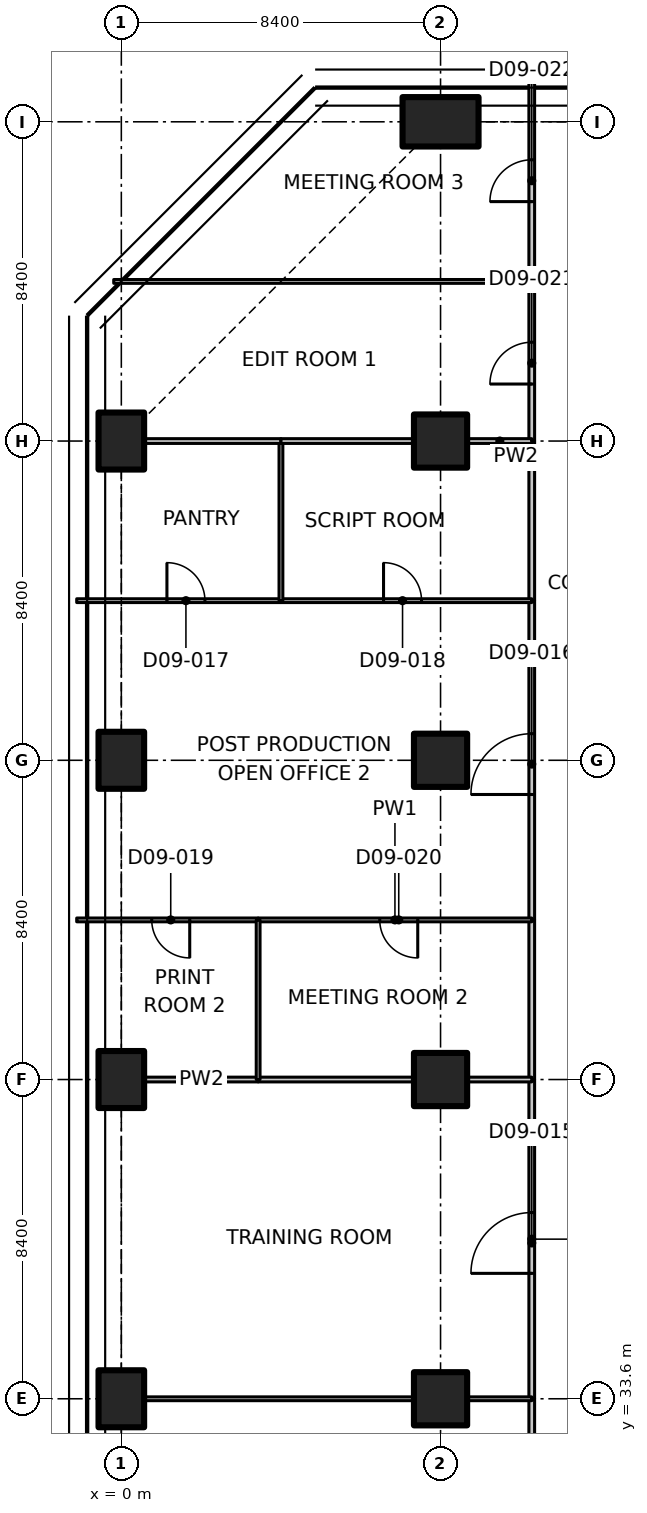
"""IFC4 building model, lengths in metres.
Left out: names, types, materials, properties, quantities, classifications, styles, units other than length and angle.
Written with IfcOpenShell. Run it as: python <this file> out.ifc"""

import sys

from ifc_helpers import new_model, si_unit, direction, frame, frame_2d, origin, origin_2d, place, context, subcontext, project, spatial, polyline, rectangle, outline, extrude, element, fill, save


model = new_model("IFC4")
c1 = context("Model", 3, precision=1e-05, world=origin(), true_north=direction((0.0, 1.0)))
c2 = subcontext(c1, "Body", "Model", "MODEL_VIEW")
j1 = project(units=[si_unit("LENGTHUNIT", "METRE"), si_unit("PLANEANGLEUNIT", "RADIAN")], contexts=[c1])
p1 = place(None, origin())
s1 = spatial("IfcSite", under=j1, at=p1, CompositionType="ELEMENT")
p2 = place(p1, origin())
s2 = spatial("IfcBuilding", under=s1, at=p2, CompositionType="ELEMENT")
p3 = place(p2, frame((0.0, 0.0, 58.1)))
s3 = spatial("IfcBuildingStorey", under=s2, at=p3, CompositionType="ELEMENT", Elevation=58.1)
for number, where, z_axis, x_axis in (
    (1, (0.0, 33.6, 0.0), (0.0, 0.0, 1.0), (1.0, 0.0, 0.0)),
    (2, (0.0, 42.0, 0.0), (0.0, 0.0, 1.0), (1.0, 0.0, 0.0)),
    (3, (0.0, 50.4, 0.0), (0.0, 0.0, 1.0), (1.0, 0.0, 0.0)),
    (4, (0.0, 58.8, 0.0), (0.0, 0.0, 1.0), (1.0, 0.0, 0.0)),
):
    element("IfcColumn", number, at=place(p3, frame(where, z_axis=z_axis, x_axis=x_axis)), inside=s3, PredefinedType="COLUMN", context=c2, shape_type="SweptSolid", body=[
        extrude(rectangle(XDim=1.2, YDim=1.5, at=origin_2d()), origin(), (0.0, 0.0, 1.0), 3.35),
    ])
for number, where, z_axis, x_axis in (
    (5, (8.4, 33.6, 0.0), (0.0, 0.0, 1.0), (1.0, 0.0, 0.0)),
    (6, (8.4, 42.0, 0.0), (0.0, 0.0, 1.0), (1.0, 0.0, 0.0)),
    (7, (8.4, 50.4, 0.0), (0.0, 0.0, 1.0), (1.0, 0.0, 0.0)),
    (8, (8.4, 58.8, 0.0), (0.0, 0.0, 1.0), (1.0, 0.0, 0.0)),
):
    element("IfcColumn", number, at=place(p3, frame(where, z_axis=z_axis, x_axis=x_axis)), inside=s3, PredefinedType="COLUMN", context=c2, shape_type="SweptSolid", body=[
        extrude(rectangle(XDim=1.4, YDim=1.4, at=origin_2d()), origin(), (0.0, 0.0, 1.0), 3.35),
    ])
p4 = place(p3, frame((8.4, 67.2, 0.0), z_axis=(0.0, 0.0, 1.0), x_axis=(0.0, 1.0, 0.0)))
e9 = element("IfcColumn", 9, at=p4, inside=s3, PredefinedType="COLUMN", context=c2, shape_type="SweptSolid", body=[
    extrude(rectangle(XDim=1.3, YDim=2.0, at=origin_2d()), origin(), (0.0, 0.0, 1.0), 3.35),
])
p5 = place(p3, frame((10.8, 25.2, 0.0), z_axis=(0.0, 0.0, 1.0), x_axis=(0.0, 1.0, 0.0)))
e10 = element("IfcWall", 10, at=p5, inside=s3, PredefinedType="PARTITIONING", context=c2, shape_type="SweptSolid", body=[
    extrude(rectangle(XDim=8.4, YDim=0.15, at=frame_2d((4.2, 0.0))), origin(), (0.0, 0.0, 1.0), 3.33),
])
p6 = place(p5, frame((3.3, 0.0, 0.0)))
e11 = element("IfcOpeningElement", 11, at=p6, cuts=e10, PredefinedType="OPENING", context=c2, shape_type="SweptSolid", body=[
    extrude(rectangle(XDim=1.6, YDim=2.1, at=frame_2d((0.8, 1.05))), frame((0.0, 0.085, 0.0), z_axis=(0.0, -1.0, 0.0), x_axis=(1.0, 0.0, 0.0)), (0.0, 0.0, 1.0), 0.17),
])
p7 = place(p3, frame((10.8, 33.6, 0.0), z_axis=(0.0, 0.0, 1.0), x_axis=(0.0, 1.0, 0.0)))
e12 = element("IfcWall", 12, at=p7, inside=s3, PredefinedType="PARTITIONING", context=c2, shape_type="SweptSolid", body=[
    extrude(rectangle(XDim=8.4, YDim=0.15, at=frame_2d((4.2, 0.0))), origin(), (0.0, 0.0, 1.0), 3.33),
])
p8 = place(p7, frame((3.3, 0.0, 0.0)))
e13 = element("IfcOpeningElement", 13, at=p8, cuts=e12, PredefinedType="OPENING", context=c2, shape_type="SweptSolid", body=[
    extrude(rectangle(XDim=1.6, YDim=2.1, at=frame_2d((0.8, 1.05))), frame((0.0, 0.085, 0.0), z_axis=(0.0, -1.0, 0.0), x_axis=(1.0, 0.0, 0.0)), (0.0, 0.0, 1.0), 0.17),
])
p9 = place(p3, frame((10.8, 46.2, 0.0), z_axis=(0.0, 0.0, 1.0), x_axis=(0.0, 1.0, 0.0)))
e14 = element("IfcWall", 14, at=p9, inside=s3, PredefinedType="PARTITIONING", context=c2, shape_type="SweptSolid", body=[
    extrude(rectangle(XDim=8.4, YDim=0.15, at=frame_2d((4.2, 0.0))), origin(), (0.0, 0.0, 1.0), 3.33),
])
p10 = place(p9, frame((3.3, 0.0, 0.0)))
e15 = element("IfcOpeningElement", 15, at=p10, cuts=e14, PredefinedType="OPENING", context=c2, shape_type="SweptSolid", body=[
    extrude(rectangle(XDim=1.6, YDim=2.1, at=frame_2d((0.8, 1.05))), frame((0.0, 0.085, 0.0), z_axis=(0.0, -1.0, 0.0), x_axis=(1.0, 0.0, 0.0)), (0.0, 0.0, 1.0), 0.17),
])
for number, where, z_axis, x_axis in (
    (16, (10.8, 54.6, 0.0), (0.0, 0.0, 1.0), (0.0, 1.0, 0.0)),
    (17, (10.8, 42.0, 0.0), (0.0, 0.0, 1.0), (0.0, 1.0, 0.0)),
):
    element("IfcWall", number, at=place(p3, frame(where, z_axis=z_axis, x_axis=x_axis)), inside=s3, PredefinedType="PARTITIONING", context=c2, shape_type="SweptSolid", body=[
        extrude(rectangle(XDim=4.2, YDim=0.15, at=frame_2d((2.1, 0.0))), origin(), (0.0, 0.0, 1.0), 3.33),
    ])
p11 = place(p3, frame((10.8, 58.8, 0.0), z_axis=(0.0, 0.0, 1.0), x_axis=(0.0, 1.0, 0.0)))
e18 = element("IfcWall", 18, at=p11, inside=s3, PredefinedType="PARTITIONING", context=c2, shape_type="SweptSolid", body=[
    extrude(rectangle(XDim=4.2, YDim=0.15, at=frame_2d((2.1, 0.0))), origin(), (0.0, 0.0, 1.0), 3.33),
])
p12 = place(p11, frame((1.5, 0.0, 0.0)))
e19 = element("IfcOpeningElement", 19, at=p12, cuts=e18, PredefinedType="OPENING", context=c2, shape_type="SweptSolid", body=[
    extrude(rectangle(XDim=1.1, YDim=2.1, at=frame_2d((0.55, 1.05))), frame((0.0, 0.085, 0.0), z_axis=(0.0, -1.0, 0.0), x_axis=(1.0, 0.0, 0.0)), (0.0, 0.0, 1.0), 0.17),
])
p13 = place(p3, frame((10.8, 63.0, 0.0), z_axis=(0.0, 0.0, 1.0), x_axis=(0.0, 1.0, 0.0)))
e20 = element("IfcWall", 20, at=p13, inside=s3, PredefinedType="PARTITIONING", context=c2, shape_type="SweptSolid", body=[
    extrude(outline(polyline([(0.0, 0.0), (5.423, 0.0), (5.423, 3.33), (5.28, 3.33), (4.65, 3.33), (4.648, 2.98), (3.752, 2.98), (3.75, 3.33), (0.0, 3.33), (0.0, 0.0)])), frame((0.0, 0.075, 0.0), z_axis=(0.0, -1.0, 0.0), x_axis=(1.0, 0.0, 0.0)), (0.0, 0.0, 1.0), 0.15),
])
p14 = place(p13, frame((2.1, 0.0, 0.0)))
e21 = element("IfcOpeningElement", 21, at=p14, cuts=e20, PredefinedType="OPENING", context=c2, shape_type="SweptSolid", body=[
    extrude(rectangle(XDim=1.1, YDim=2.1, at=frame_2d((0.55, 1.05))), frame((0.0, 0.085, 0.0), z_axis=(0.0, -1.0, 0.0), x_axis=(1.0, 0.0, 0.0)), (0.0, 0.0, 1.0), 0.17),
])
p15 = place(p3, frame((0.62, 33.6, 0.0), z_axis=(0.0, 0.0, 1.0), x_axis=(1.0, 0.0, 0.0)))
e22 = element("IfcWall", 22, at=p15, inside=s3, PredefinedType="PARTITIONING", context=c2, shape_type="SweptSolid", body=[
    extrude(rectangle(XDim=7.06, YDim=0.1, at=frame_2d((3.53, 0.0))), origin(), (0.0, 0.0, 1.0), 3.33),
])
p16 = place(p3, frame((9.12, 33.6, 0.0), z_axis=(0.0, 0.0, 1.0), x_axis=(1.0, 0.0, 0.0)))
e23 = element("IfcWall", 23, at=p16, inside=s3, PredefinedType="PARTITIONING", context=c2, shape_type="SweptSolid", body=[
    extrude(rectangle(XDim=1.68, YDim=0.1, at=frame_2d((0.84, 0.0))), origin(), (0.0, 0.0, 1.0), 3.33),
])
p17 = place(p3, frame((0.62, 42.0, 0.0), z_axis=(0.0, 0.0, 1.0), x_axis=(1.0, 0.0, 0.0)))
e24 = element("IfcWall", 24, at=p17, inside=s3, PredefinedType="PARTITIONING", context=c2, shape_type="SweptSolid", body=[
    extrude(rectangle(XDim=2.98, YDim=0.125, at=frame_2d((1.49, 0.0))), origin(), (0.0, 0.0, 1.0), 3.33),
])
p18 = place(p3, frame((3.6, 42.0, 0.0), z_axis=(0.0, 0.0, 1.0), x_axis=(1.0, 0.0, 0.0)))
e25 = element("IfcWall", 25, at=p18, inside=s3, PredefinedType="PARTITIONING", context=c2, shape_type="SweptSolid", body=[
    extrude(rectangle(XDim=4.08, YDim=0.125, at=frame_2d((2.04, 0.0))), origin(), (0.0, 0.0, 1.0), 3.33),
])
p19 = place(p3, frame((9.12, 42.0, 0.0), z_axis=(0.0, 0.0, 1.0), x_axis=(1.0, 0.0, 0.0)))
e26 = element("IfcWall", 26, at=p19, inside=s3, PredefinedType="PARTITIONING", context=c2, shape_type="SweptSolid", body=[
    extrude(rectangle(XDim=1.68, YDim=0.125, at=frame_2d((0.84, 0.0))), origin(), (0.0, 0.0, 1.0), 3.33),
])
p20 = place(p3, frame((-1.174, 54.6, 0.0), z_axis=(0.0, 0.0, 1.0), x_axis=(1.0, 0.0, 0.0)))
e27 = element("IfcWall", 27, at=p20, inside=s3, PredefinedType="PARTITIONING", context=c2, shape_type="SweptSolid", body=[
    extrude(outline(polyline([(0.0, 0.0), (5.374, 0.0), (5.374, 3.33), (1.624, 3.33), (1.622, 2.98), (0.726, 2.98), (0.724, 3.33), (0.074, 3.33), (0.0, 3.33), (0.0, 0.0)])), frame((0.0, 0.05, 0.0), z_axis=(0.0, -1.0, 0.0), x_axis=(1.0, 0.0, 0.0)), (0.0, 0.0, 1.0), 0.1),
])
p21 = place(p20, frame((2.374, 0.0, 0.0)))
e28 = element("IfcOpeningElement", 28, at=p21, cuts=e27, PredefinedType="OPENING", context=c2, shape_type="SweptSolid", body=[
    extrude(rectangle(XDim=1.0, YDim=2.1, at=frame_2d((0.5, 1.05))), frame((0.0, 0.06, 0.0), z_axis=(0.0, -1.0, 0.0), x_axis=(1.0, 0.0, 0.0)), (0.0, 0.0, 1.0), 0.12),
])
p22 = place(p3, frame((4.2, 54.6, 0.0), z_axis=(0.0, 0.0, 1.0), x_axis=(1.0, 0.0, 0.0)))
e29 = element("IfcWall", 29, at=p22, inside=s3, PredefinedType="PARTITIONING", context=c2, shape_type="SweptSolid", body=[
    extrude(rectangle(XDim=6.6, YDim=0.1, at=frame_2d((3.3, 0.0))), origin(), (0.0, 0.0, 1.0), 3.33),
])
p23 = place(p22, frame((2.7, 0.0, 0.0)))
e30 = element("IfcOpeningElement", 30, at=p23, cuts=e29, PredefinedType="OPENING", context=c2, shape_type="SweptSolid", body=[
    extrude(rectangle(XDim=1.0, YDim=2.1, at=frame_2d((0.5, 1.05))), frame((0.0, 0.06, 0.0), z_axis=(0.0, -1.0, 0.0), x_axis=(1.0, 0.0, 0.0)), (0.0, 0.0, 1.0), 0.12),
])
p24 = place(p3, frame((3.6, 46.2, 0.0), z_axis=(0.0, 0.0, 1.0), x_axis=(-1.0, 0.0, 0.0)))
e31 = element("IfcWall", 31, at=p24, inside=s3, PredefinedType="PARTITIONING", context=c2, shape_type="SweptSolid", body=[
    extrude(outline(polyline([(0.0, 0.0), (4.774, 0.0), (4.774, 3.33), (4.7, 3.33), (4.05, 3.33), (4.048, 2.98), (3.152, 2.98), (3.15, 3.33), (0.0, 3.33), (0.0, 0.0)])), frame((0.0, 0.05, 0.0), z_axis=(0.0, -1.0, 0.0), x_axis=(1.0, 0.0, 0.0)), (0.0, 0.0, 1.0), 0.1),
])
p25 = place(p24, frame((1.8, 0.0, 0.0)))
e32 = element("IfcOpeningElement", 32, at=p25, cuts=e31, PredefinedType="OPENING", context=c2, shape_type="SweptSolid", body=[
    extrude(rectangle(XDim=1.0, YDim=2.1, at=frame_2d((0.5, 1.05))), frame((0.0, 0.06, 0.0), z_axis=(0.0, -1.0, 0.0), x_axis=(1.0, 0.0, 0.0)), (0.0, 0.0, 1.0), 0.12),
])
p26 = place(p3, frame((10.8, 46.2, 0.0), z_axis=(0.0, 0.0, 1.0), x_axis=(-1.0, 0.0, 0.0)))
e33 = element("IfcWall", 33, at=p26, inside=s3, PredefinedType="PARTITIONING", context=c2, shape_type="SweptSolid", body=[
    extrude(rectangle(XDim=7.2, YDim=0.1, at=frame_2d((3.6, 0.0))), origin(), (0.0, 0.0, 1.0), 3.33),
])
p27 = place(p26, frame((3.0, 0.0, 0.0)))
e34 = element("IfcOpeningElement", 34, at=p27, cuts=e33, PredefinedType="OPENING", context=c2, shape_type="SweptSolid", body=[
    extrude(rectangle(XDim=1.0, YDim=2.1, at=frame_2d((0.5, 1.05))), frame((0.0, 0.06, 0.0), z_axis=(0.0, -1.0, 0.0), x_axis=(1.0, 0.0, 0.0)), (0.0, 0.0, 1.0), 0.12),
])
p28 = place(p3, frame((4.2, 58.8, 0.0), z_axis=(0.0, 0.0, 1.0), x_axis=(0.0, -1.0, 0.0)))
e35 = element("IfcWall", 35, at=p28, inside=s3, PredefinedType="PARTITIONING", context=c2, shape_type="SweptSolid", body=[
    extrude(rectangle(XDim=4.2, YDim=0.1, at=frame_2d((2.1, 0.0))), origin(), (0.0, 0.0, 1.0), 3.33),
])
p29 = place(p3, frame((0.62, 58.8, 0.0), z_axis=(0.0, 0.0, 1.0), x_axis=(1.0, 0.0, 0.0)))
e36 = element("IfcWall", 36, at=p29, inside=s3, PredefinedType="PARTITIONING", context=c2, shape_type="SweptSolid", body=[
    extrude(rectangle(XDim=3.58, YDim=0.125, at=frame_2d((1.79, 0.0))), origin(), (0.0, 0.0, 1.0), 3.33),
])
p30 = place(p3, frame((4.2, 58.8, 0.0), z_axis=(0.0, 0.0, 1.0), x_axis=(1.0, 0.0, 0.0)))
e37 = element("IfcWall", 37, at=p30, inside=s3, PredefinedType="PARTITIONING", context=c2, shape_type="SweptSolid", body=[
    extrude(rectangle(XDim=3.48, YDim=0.125, at=frame_2d((1.74, 0.0))), origin(), (0.0, 0.0, 1.0), 3.33),
])
p31 = place(p3, frame((9.12, 58.8, 0.0), z_axis=(0.0, 0.0, 1.0), x_axis=(1.0, 0.0, 0.0)))
e38 = element("IfcWall", 38, at=p31, inside=s3, PredefinedType="PARTITIONING", context=c2, shape_type="SweptSolid", body=[
    extrude(rectangle(XDim=1.68, YDim=0.125, at=frame_2d((0.84, 0.0))), origin(), (0.0, 0.0, 1.0), 3.33),
])
p32 = place(p3, frame((3.6, 46.2, 0.0), z_axis=(0.0, 0.0, 1.0), x_axis=(0.0, -1.0, 0.0)))
e39 = element("IfcWall", 39, at=p32, inside=s3, PredefinedType="PARTITIONING", context=c2, shape_type="SweptSolid", body=[
    extrude(rectangle(XDim=4.2, YDim=0.1, at=frame_2d((2.1, 0.0))), origin(), (0.0, 0.0, 1.0), 3.33),
])
p33 = place(p3, frame((-0.2, 63.0, 0.0), z_axis=(0.0, 0.0, 1.0), x_axis=(1.0, 0.0, 0.0)))
e40 = element("IfcWall", 40, at=p33, inside=s3, PredefinedType="PARTITIONING", context=c2, shape_type="SweptSolid", body=[
    extrude(outline(polyline([(0.0, 0.0), (11.0, 0.0), (11.0, 3.33), (5.066, 3.33), (5.064, 2.98), (3.736, 2.98), (3.734, 3.33), (0.0, 3.33), (0.0, 0.0)])), frame((0.0, 0.05, 0.0), z_axis=(0.0, -1.0, 0.0), x_axis=(1.0, 0.0, 0.0)), (0.0, 0.0, 1.0), 0.1),
])
p34 = place(p8, origin())
e41 = element("IfcDoor", 41, at=p34, inside=s3, OperationType="DOUBLE_DOOR_SINGLE_SWING", PredefinedType="DOOR", context=c2, shape_type="SweptSolid", body=[
    extrude(rectangle(XDim=1.6, YDim=2.1, at=frame_2d((0.8, 1.05))), frame((0.0, 0.025, 0.0), z_axis=(0.0, -1.0, 0.0), x_axis=(1.0, 0.0, 0.0)), (0.0, 0.0, 1.0), 0.05),
])
fill(e13, e41)
p35 = place(p10, origin())
e42 = element("IfcDoor", 42, at=p35, inside=s3, OperationType="DOUBLE_DOOR_SINGLE_SWING", PredefinedType="DOOR", context=c2, shape_type="SweptSolid", body=[
    extrude(rectangle(XDim=1.6, YDim=2.1, at=frame_2d((0.8, 1.05))), frame((0.0, 0.025, 0.0), z_axis=(0.0, -1.0, 0.0), x_axis=(1.0, 0.0, 0.0)), (0.0, 0.0, 1.0), 0.05),
])
fill(e15, e42)
p36 = place(p21, origin())
e43 = element("IfcDoor", 43, at=p36, inside=s3, OperationType="SINGLE_SWING_LEFT", PredefinedType="DOOR", context=c2, shape_type="SweptSolid", body=[
    extrude(rectangle(XDim=1.0, YDim=2.1, at=frame_2d((0.5, 1.05))), frame((0.0, 0.025, 0.0), z_axis=(0.0, -1.0, 0.0), x_axis=(1.0, 0.0, 0.0)), (0.0, 0.0, 1.0), 0.05),
])
fill(e28, e43)
p37 = place(p23, origin())
e44 = element("IfcDoor", 44, at=p37, inside=s3, OperationType="SINGLE_SWING_LEFT", PredefinedType="DOOR", context=c2, shape_type="SweptSolid", body=[
    extrude(rectangle(XDim=1.0, YDim=2.1, at=frame_2d((0.5, 1.05))), frame((0.0, 0.025, 0.0), z_axis=(0.0, -1.0, 0.0), x_axis=(1.0, 0.0, 0.0)), (0.0, 0.0, 1.0), 0.05),
])
fill(e30, e44)
p38 = place(p25, origin())
e45 = element("IfcDoor", 45, at=p38, inside=s3, OperationType="SINGLE_SWING_LEFT", PredefinedType="DOOR", context=c2, shape_type="SweptSolid", body=[
    extrude(rectangle(XDim=1.0, YDim=2.1, at=frame_2d((0.5, 1.05))), frame((0.0, 0.025, 0.0), z_axis=(0.0, -1.0, 0.0), x_axis=(1.0, 0.0, 0.0)), (0.0, 0.0, 1.0), 0.05),
])
fill(e32, e45)
p39 = place(p27, origin())
e46 = element("IfcDoor", 46, at=p39, inside=s3, OperationType="SINGLE_SWING_LEFT", PredefinedType="DOOR", context=c2, shape_type="SweptSolid", body=[
    extrude(rectangle(XDim=1.0, YDim=2.1, at=frame_2d((0.5, 1.05))), frame((0.0, 0.025, 0.0), z_axis=(0.0, -1.0, 0.0), x_axis=(1.0, 0.0, 0.0)), (0.0, 0.0, 1.0), 0.05),
])
fill(e34, e46)
p40 = place(p12, origin())
e47 = element("IfcDoor", 47, at=p40, inside=s3, OperationType="SINGLE_SWING_LEFT", PredefinedType="DOOR", context=c2, shape_type="SweptSolid", body=[
    extrude(rectangle(XDim=1.1, YDim=2.1, at=frame_2d((0.55, 1.05))), frame((0.0, 0.025, 0.0), z_axis=(0.0, -1.0, 0.0), x_axis=(1.0, 0.0, 0.0)), (0.0, 0.0, 1.0), 0.05),
])
fill(e19, e47)
p41 = place(p14, origin())
e48 = element("IfcDoor", 48, at=p41, inside=s3, OperationType="SINGLE_SWING_LEFT", PredefinedType="DOOR", context=c2, shape_type="SweptSolid", body=[
    extrude(rectangle(XDim=1.1, YDim=2.1, at=frame_2d((0.55, 1.05))), frame((0.0, 0.025, 0.0), z_axis=(0.0, -1.0, 0.0), x_axis=(1.0, 0.0, 0.0)), (0.0, 0.0, 1.0), 0.05),
])
fill(e21, e48)
save(model, sys.argv[1])
